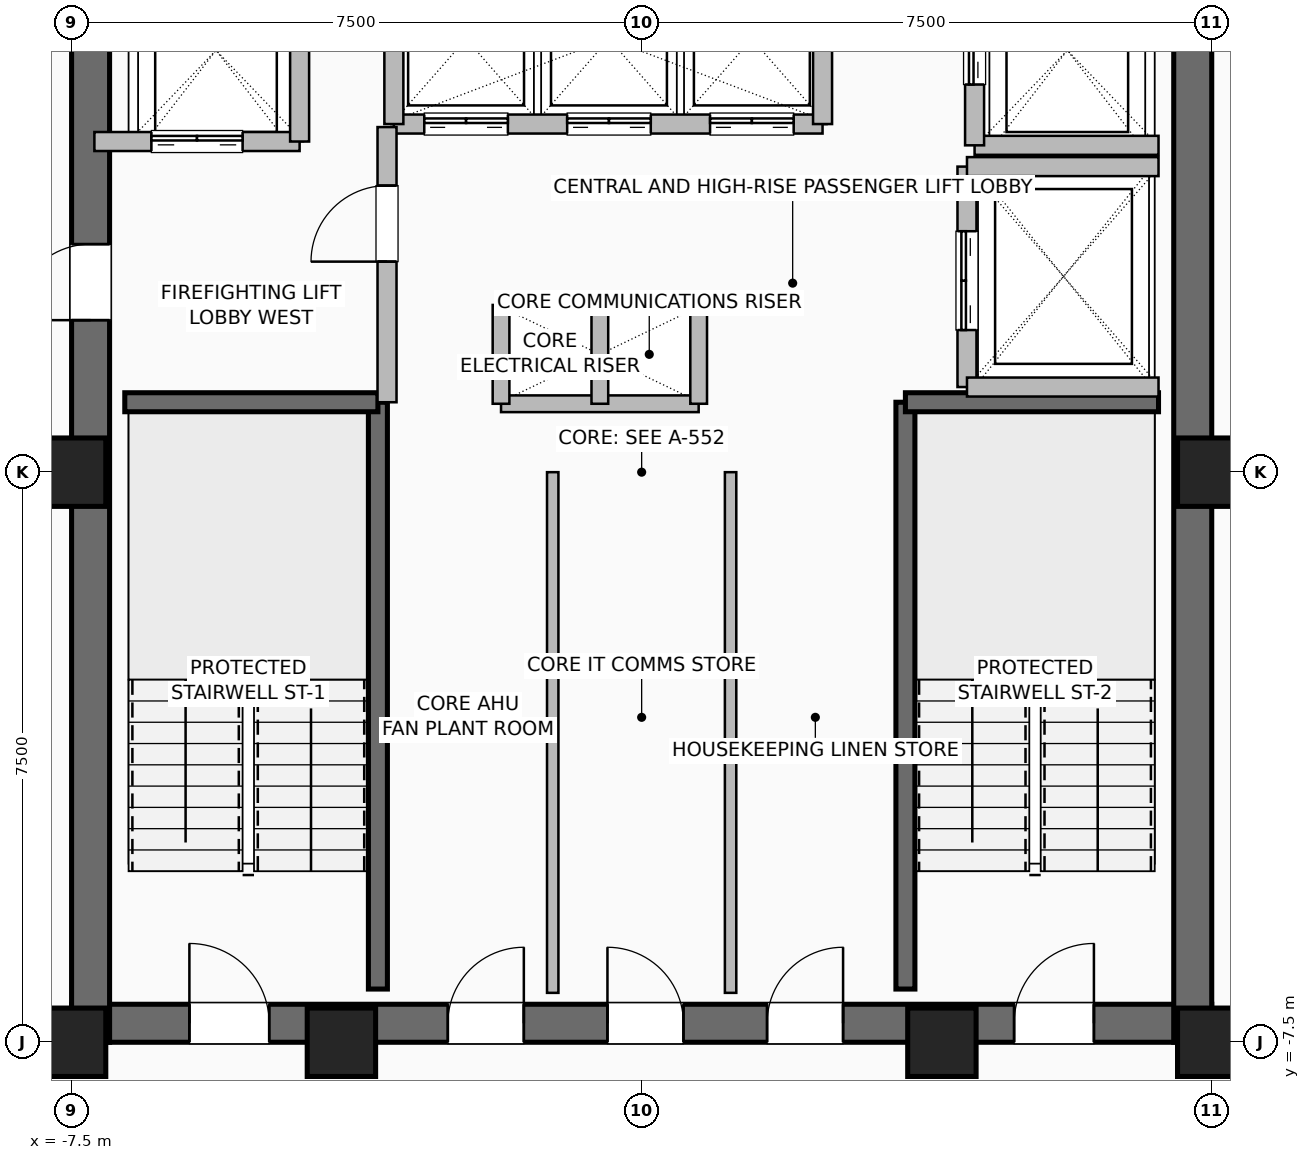
"""IFC4 building model, lengths in metres.
Left out: names, types, materials, properties, quantities, classifications, styles, units other than length and angle.
Written with IfcOpenShell. Run it as: python <this file> out.ifc"""

import sys

from ifc_helpers import new_model, si_unit, direction, frame, frame_2d, origin, origin_2d, place, context, subcontext, project, spatial, rectangle, hollow_rectangle, extrude, element, fill, save


model = new_model("IFC4")
c1 = context("Model", 3, precision=1e-05, world=origin(), true_north=direction((0.0, 1.0)))
c2 = subcontext(c1, "Body", "Model", "MODEL_VIEW")
j1 = project(units=[si_unit("LENGTHUNIT", "METRE"), si_unit("PLANEANGLEUNIT", "RADIAN")], contexts=[c1])
p1 = place(None, origin())
s1 = spatial("IfcSite", under=j1, at=p1, CompositionType="ELEMENT")
p2 = place(p1, origin())
s2 = spatial("IfcBuilding", under=s1, at=p2, CompositionType="ELEMENT")
p3 = place(p2, frame((0.0, 0.0, 205.8)))
s3 = spatial("IfcBuildingStorey", under=s2, at=p3, CompositionType="ELEMENT", Elevation=205.8)
for number, where, z_axis, x_axis in (
    (1, (-7.5, -7.5, 0.0), (0.0, 0.0, 1.0), (1.0, 0.0, 0.0)),
    (2, (-3.95, -7.5, 0.0), (0.0, 0.0, 1.0), (1.0, 0.0, 0.0)),
    (3, (3.95, -7.5, 0.0), (0.0, 0.0, 1.0), (1.0, 0.0, 0.0)),
    (4, (7.5, -7.5, 0.0), (0.0, 0.0, 1.0), (1.0, 0.0, 0.0)),
    (5, (7.5, 0.0, 0.0), (0.0, 0.0, 1.0), (1.0, 0.0, 0.0)),
    (6, (-7.5, 0.0, 0.0), (0.0, 0.0, 1.0), (1.0, 0.0, 0.0)),
):
    element("IfcColumn", number, at=place(p3, frame(where, z_axis=z_axis, x_axis=x_axis)), inside=s3, PredefinedType="COLUMN", context=c2, shape_type="SweptSolid", body=[
        extrude(hollow_rectangle(XDim=0.9, YDim=0.9, WallThickness=0.045, at=origin_2d()), origin(), (0.0, 0.0, 1.0), 3.6),
    ])
p4 = place(p3, frame((-7.5, -7.25, 0.0), z_axis=(0.0, 0.0, 1.0), x_axis=(1.0, 0.0, 0.0)))
e7 = element("IfcWall", 7, at=p4, inside=s3, PredefinedType="SHEAR", context=c2, shape_type="SweptSolid", body=[
    extrude(rectangle(XDim=15.0, YDim=0.5, at=frame_2d((7.5, 0.0))), origin(), (0.0, 0.0, 1.0), 3.36),
])
p5 = place(p4, frame((1.55, 0.0, 0.0)))
e8 = element("IfcOpeningElement", 8, at=p5, cuts=e7, PredefinedType="OPENING", context=c2, shape_type="SweptSolid", body=[
    extrude(rectangle(XDim=1.05, YDim=2.08, at=frame_2d((0.525, 1.04))), frame((0.0, 0.26, 0.0), z_axis=(0.0, -1.0, 0.0), x_axis=(1.0, 0.0, 0.0)), (0.0, 0.0, 1.0), 0.52),
])
p6 = place(p4, frame((12.4, 0.0, 0.0)))
e9 = element("IfcOpeningElement", 9, at=p6, cuts=e7, PredefinedType="OPENING", context=c2, shape_type="SweptSolid", body=[
    extrude(rectangle(XDim=1.05, YDim=2.08, at=frame_2d((0.525, 1.04))), frame((0.0, 0.26, 0.0), z_axis=(0.0, -1.0, 0.0), x_axis=(1.0, 0.0, 0.0)), (0.0, 0.0, 1.0), 0.52),
])
p7 = place(p4, frame((4.95, 0.0, 0.0)))
e10 = element("IfcOpeningElement", 10, at=p7, cuts=e7, PredefinedType="OPENING", context=c2, shape_type="SweptSolid", body=[
    extrude(rectangle(XDim=1.0, YDim=2.08, at=frame_2d((0.5, 1.04))), frame((0.0, 0.26, 0.0), z_axis=(0.0, -1.0, 0.0), x_axis=(1.0, 0.0, 0.0)), (0.0, 0.0, 1.0), 0.52),
])
p8 = place(p4, frame((7.05, 0.0, 0.0)))
e11 = element("IfcOpeningElement", 11, at=p8, cuts=e7, PredefinedType="OPENING", context=c2, shape_type="SweptSolid", body=[
    extrude(rectangle(XDim=1.0, YDim=2.08, at=frame_2d((0.5, 1.04))), frame((0.0, 0.26, 0.0), z_axis=(0.0, -1.0, 0.0), x_axis=(1.0, 0.0, 0.0)), (0.0, 0.0, 1.0), 0.52),
])
p9 = place(p4, frame((9.15, 0.0, 0.0)))
e12 = element("IfcOpeningElement", 12, at=p9, cuts=e7, PredefinedType="OPENING", context=c2, shape_type="SweptSolid", body=[
    extrude(rectangle(XDim=1.0, YDim=2.08, at=frame_2d((0.5, 1.04))), frame((0.0, 0.26, 0.0), z_axis=(0.0, -1.0, 0.0), x_axis=(1.0, 0.0, 0.0)), (0.0, 0.0, 1.0), 0.52),
])
p10 = place(p3, frame((-7.25, -7.5, 0.0), z_axis=(0.0, 0.0, 1.0), x_axis=(0.0, 1.0, 0.0)))
e13 = element("IfcWall", 13, at=p10, inside=s3, PredefinedType="SHEAR", context=c2, shape_type="SweptSolid", body=[
    extrude(rectangle(XDim=15.0, YDim=0.5, at=frame_2d((7.5, 0.0))), origin(), (0.0, 0.0, 1.0), 3.36),
])
p11 = place(p10, frame((9.5, 0.0, 0.0)))
e14 = element("IfcOpeningElement", 14, at=p11, cuts=e13, PredefinedType="OPENING", context=c2, shape_type="SweptSolid", body=[
    extrude(rectangle(XDim=1.0, YDim=2.08, at=frame_2d((0.5, 1.04))), frame((0.0, 0.26, 0.0), z_axis=(0.0, -1.0, 0.0), x_axis=(1.0, 0.0, 0.0)), (0.0, 0.0, 1.0), 0.52),
])
p12 = place(p3, frame((7.25, -7.5, 0.0), z_axis=(0.0, 0.0, 1.0), x_axis=(0.0, 1.0, 0.0)))
e15 = element("IfcWall", 15, at=p12, inside=s3, PredefinedType="SHEAR", context=c2, shape_type="SweptSolid", body=[
    extrude(rectangle(XDim=15.0, YDim=0.5, at=frame_2d((7.5, 0.0))), origin(), (0.0, 0.0, 1.0), 3.36),
])
p13 = place(p3, frame((-3.47, -6.8, 0.0), z_axis=(0.0, 0.0, 1.0), x_axis=(0.0, 1.0, 0.0)))
e16 = element("IfcWall", 16, at=p13, inside=s3, PredefinedType="SHEAR", context=c2, shape_type="SweptSolid", body=[
    extrude(rectangle(XDim=7.72, YDim=0.25, at=frame_2d((3.86, 0.0))), origin(), (0.0, 0.0, 1.0), 3.36),
])
p14 = place(p3, frame((-6.8, 0.92, 0.0), z_axis=(0.0, 0.0, 1.0), x_axis=(1.0, 0.0, 0.0)))
e17 = element("IfcWall", 17, at=p14, inside=s3, PredefinedType="SHEAR", context=c2, shape_type="SweptSolid", body=[
    extrude(rectangle(XDim=3.33, YDim=0.25, at=frame_2d((1.665, 0.0))), origin(), (0.0, 0.0, 1.0), 3.36),
])
p15 = place(p3, frame((3.47, -6.8, 0.0), z_axis=(0.0, 0.0, 1.0), x_axis=(0.0, 1.0, 0.0)))
e18 = element("IfcWall", 18, at=p15, inside=s3, PredefinedType="SHEAR", context=c2, shape_type="SweptSolid", body=[
    extrude(rectangle(XDim=7.72, YDim=0.25, at=frame_2d((3.86, 0.0))), origin(), (0.0, 0.0, 1.0), 3.36),
])
p16 = place(p3, frame((3.47, 0.92, 0.0), z_axis=(0.0, 0.0, 1.0), x_axis=(1.0, 0.0, 0.0)))
e19 = element("IfcWall", 19, at=p16, inside=s3, PredefinedType="SHEAR", context=c2, shape_type="SweptSolid", body=[
    extrude(rectangle(XDim=3.33, YDim=0.25, at=frame_2d((1.665, 0.0))), origin(), (0.0, 0.0, 1.0), 3.36),
])
for number, where, z_axis, x_axis in (
    (20, (-1.85, 2.2, 0.0), (0.0, 0.0, 1.0), (1.0, 0.0, 0.0)),
    (21, (-1.85, 0.9, 0.0), (0.0, 0.0, 1.0), (1.0, 0.0, 0.0)),
):
    element("IfcWall", number, at=place(p3, frame(where, z_axis=z_axis, x_axis=x_axis)), inside=s3, PredefinedType="PARTITIONING", context=c2, shape_type="SweptSolid", body=[
        extrude(rectangle(XDim=2.6, YDim=0.22, at=frame_2d((1.3, 0.0))), origin(), (0.0, 0.0, 1.0), 3.36),
    ])
for number, where, z_axis, x_axis in (
    (22, (-0.55, 0.9, 0.0), (0.0, 0.0, 1.0), (0.0, 1.0, 0.0)),
    (23, (0.75, 0.9, 0.0), (0.0, 0.0, 1.0), (0.0, 1.0, 0.0)),
    (24, (-1.85, 0.9, 0.0), (0.0, 0.0, 1.0), (0.0, 1.0, 0.0)),
):
    element("IfcWall", number, at=place(p3, frame(where, z_axis=z_axis, x_axis=x_axis)), inside=s3, PredefinedType="PARTITIONING", context=c2, shape_type="SweptSolid", body=[
        extrude(rectangle(XDim=1.3, YDim=0.22, at=frame_2d((0.65, 0.0))), origin(), (0.0, 0.0, 1.0), 3.36),
    ])
p17 = place(p3, frame((-3.26, 4.58, 0.0), z_axis=(0.0, 0.0, 1.0), x_axis=(1.0, 0.0, 0.0)))
e25 = element("IfcWall", 25, at=p17, inside=s3, PredefinedType="SHEAR", context=c2, shape_type="SweptSolid", body=[
    extrude(rectangle(XDim=5.64, YDim=0.25, at=frame_2d((2.82, 0.0))), origin(), (0.0, 0.0, 1.0), 3.36),
])
p18 = place(p17, frame((0.4, 0.0, 0.0)))
e26 = element("IfcOpeningElement", 26, at=p18, cuts=e25, PredefinedType="OPENING", context=c2, shape_type="SweptSolid", body=[
    extrude(rectangle(XDim=1.1, YDim=2.2, at=frame_2d((0.55, 1.1))), frame((0.0, 0.135, 0.0), z_axis=(0.0, -1.0, 0.0), x_axis=(1.0, 0.0, 0.0)), (0.0, 0.0, 1.0), 0.27),
])
p19 = place(p17, frame((2.28, 0.0, 0.0)))
e27 = element("IfcOpeningElement", 27, at=p19, cuts=e25, PredefinedType="OPENING", context=c2, shape_type="SweptSolid", body=[
    extrude(rectangle(XDim=1.1, YDim=2.2, at=frame_2d((0.55, 1.1))), frame((0.0, 0.135, 0.0), z_axis=(0.0, -1.0, 0.0), x_axis=(1.0, 0.0, 0.0)), (0.0, 0.0, 1.0), 0.27),
])
p20 = place(p17, frame((4.16, 0.0, 0.0)))
e28 = element("IfcOpeningElement", 28, at=p20, cuts=e25, PredefinedType="OPENING", context=c2, shape_type="SweptSolid", body=[
    extrude(rectangle(XDim=1.1, YDim=2.2, at=frame_2d((0.55, 1.1))), frame((0.0, 0.135, 0.0), z_axis=(0.0, -1.0, 0.0), x_axis=(1.0, 0.0, 0.0)), (0.0, 0.0, 1.0), 0.27),
])
for number, where, z_axis, x_axis in (
    (29, (-3.26, 4.58, 0.0), (0.0, 0.0, 1.0), (0.0, 1.0, 0.0)),
    (30, (2.38, 4.58, 0.0), (0.0, 0.0, 1.0), (0.0, 1.0, 0.0)),
):
    element("IfcWall", number, at=place(p3, frame(where, z_axis=z_axis, x_axis=x_axis)), inside=s3, PredefinedType="SHEAR", context=c2, shape_type="SweptSolid", body=[
        extrude(rectangle(XDim=2.22, YDim=0.25, at=frame_2d((1.11, 0.0))), origin(), (0.0, 0.0, 1.0), 3.36),
    ])
p21 = place(p3, frame((-7.2, 4.35, 0.0), z_axis=(0.0, 0.0, 1.0), x_axis=(1.0, 0.0, 0.0)))
e31 = element("IfcWall", 31, at=p21, inside=s3, PredefinedType="SHEAR", context=c2, shape_type="SweptSolid", body=[
    extrude(rectangle(XDim=2.7, YDim=0.25, at=frame_2d((1.35, 0.0))), origin(), (0.0, 0.0, 1.0), 3.36),
])
p22 = place(p21, frame((0.75, 0.0, 0.0)))
e32 = element("IfcOpeningElement", 32, at=p22, cuts=e31, PredefinedType="OPENING", context=c2, shape_type="SweptSolid", body=[
    extrude(rectangle(XDim=1.2, YDim=2.2, at=frame_2d((0.6, 1.1))), frame((0.0, 0.135, 0.0), z_axis=(0.0, -1.0, 0.0), x_axis=(1.0, 0.0, 0.0)), (0.0, 0.0, 1.0), 0.27),
])
p23 = place(p3, frame((-4.5, 4.35, 0.0), z_axis=(0.0, 0.0, 1.0), x_axis=(0.0, 1.0, 0.0)))
e33 = element("IfcWall", 33, at=p23, inside=s3, PredefinedType="SHEAR", context=c2, shape_type="SweptSolid", body=[
    extrude(rectangle(XDim=2.85, YDim=0.25, at=frame_2d((1.425, 0.0))), origin(), (0.0, 0.0, 1.0), 3.36),
])
p24 = place(p3, frame((4.38, 4.3, 0.0), z_axis=(0.0, 0.0, 1.0), x_axis=(1.0, 0.0, 0.0)))
e34 = element("IfcWall", 34, at=p24, inside=s3, PredefinedType="SHEAR", context=c2, shape_type="SweptSolid", body=[
    extrude(rectangle(XDim=2.42, YDim=0.25, at=frame_2d((1.21, 0.0))), origin(), (0.0, 0.0, 1.0), 3.36),
])
p25 = place(p3, frame((4.38, 4.3, 0.0), z_axis=(0.0, 0.0, 1.0), x_axis=(0.0, 1.0, 0.0)))
e35 = element("IfcWall", 35, at=p25, inside=s3, PredefinedType="SHEAR", context=c2, shape_type="SweptSolid", body=[
    extrude(rectangle(XDim=2.5, YDim=0.25, at=frame_2d((1.25, 0.0))), origin(), (0.0, 0.0, 1.0), 3.36),
])
p26 = place(p25, frame((0.8, 0.0, 0.0)))
e36 = element("IfcOpeningElement", 36, at=p26, cuts=e35, PredefinedType="OPENING", context=c2, shape_type="SweptSolid", body=[
    extrude(rectangle(XDim=1.2, YDim=2.2, at=frame_2d((0.6, 1.1))), frame((0.0, 0.135, 0.0), z_axis=(0.0, -1.0, 0.0), x_axis=(1.0, 0.0, 0.0)), (0.0, 0.0, 1.0), 0.27),
])
p27 = place(p3, frame((4.28, 1.12, 0.0), z_axis=(0.0, 0.0, 1.0), x_axis=(0.0, 1.0, 0.0)))
e37 = element("IfcWall", 37, at=p27, inside=s3, PredefinedType="SHEAR", context=c2, shape_type="SweptSolid", body=[
    extrude(rectangle(XDim=2.9, YDim=0.25, at=frame_2d((1.45, 0.0))), origin(), (0.0, 0.0, 1.0), 3.36),
])
p28 = place(p27, frame((0.75, 0.0, 0.0)))
e38 = element("IfcOpeningElement", 38, at=p28, cuts=e37, PredefinedType="OPENING", context=c2, shape_type="SweptSolid", body=[
    extrude(rectangle(XDim=1.3, YDim=2.3, at=frame_2d((0.65, 1.15))), frame((0.0, 0.135, 0.0), z_axis=(0.0, -1.0, 0.0), x_axis=(1.0, 0.0, 0.0)), (0.0, 0.0, 1.0), 0.27),
])
for number, where, z_axis, x_axis in (
    (39, (4.28, 1.12, 0.0), (0.0, 0.0, 1.0), (1.0, 0.0, 0.0)),
    (40, (4.28, 4.02, 0.0), (0.0, 0.0, 1.0), (1.0, 0.0, 0.0)),
):
    element("IfcWall", number, at=place(p3, frame(where, z_axis=z_axis, x_axis=x_axis)), inside=s3, PredefinedType="SHEAR", context=c2, shape_type="SweptSolid", body=[
        extrude(rectangle(XDim=2.52, YDim=0.25, at=frame_2d((1.26, 0.0))), origin(), (0.0, 0.0, 1.0), 3.36),
    ])
p29 = place(p3, frame((-3.35, 0.92, 0.0), z_axis=(0.0, 0.0, 1.0), x_axis=(0.0, 1.0, 0.0)))
e41 = element("IfcWall", 41, at=p29, inside=s3, PredefinedType="SHEAR", context=c2, shape_type="SweptSolid", body=[
    extrude(rectangle(XDim=3.62, YDim=0.25, at=frame_2d((1.81, 0.0))), origin(), (0.0, 0.0, 1.0), 3.36),
])
p30 = place(p29, frame((1.85, 0.0, 0.0)))
e42 = element("IfcOpeningElement", 42, at=p30, cuts=e41, PredefinedType="OPENING", context=c2, shape_type="SweptSolid", body=[
    extrude(rectangle(XDim=1.0, YDim=2.08, at=frame_2d((0.5, 1.04))), frame((0.0, 0.135, 0.0), z_axis=(0.0, -1.0, 0.0), x_axis=(1.0, 0.0, 0.0)), (0.0, 0.0, 1.0), 0.27),
])
for number, where, z_axis, x_axis in (
    (43, (-1.17, -6.85, 0.0), (0.0, 0.0, 1.0), (0.0, 1.0, 0.0)),
    (44, (1.17, -6.85, 0.0), (0.0, 0.0, 1.0), (0.0, 1.0, 0.0)),
):
    element("IfcWall", number, at=place(p3, frame(where, z_axis=z_axis, x_axis=x_axis)), inside=s3, PredefinedType="PARTITIONING", context=c2, shape_type="SweptSolid", body=[
        extrude(rectangle(XDim=6.85, YDim=0.15, at=frame_2d((3.425, 0.0))), origin(), (0.0, 0.0, 1.0), 3.36),
    ])
p31 = place(p3, frame((7.45, -7.48, 0.0), z_axis=(0.0, 0.0, 1.0), x_axis=(1.0, 0.0, 0.0)))
e45 = element("IfcWall", 45, at=p31, inside=s3, PredefinedType="PARTITIONING", context=c2, shape_type="SweptSolid", body=[
    extrude(rectangle(XDim=0.95, YDim=0.15, at=frame_2d((0.475, 0.0))), origin(), (0.0, 0.0, 1.0), 3.36),
])
p32 = place(p5, origin())
e46 = element("IfcDoor", 46, at=p32, inside=s3, OperationType="SINGLE_SWING_LEFT", PredefinedType="DOOR", context=c2, shape_type="SweptSolid", body=[
    extrude(rectangle(XDim=1.05, YDim=2.08, at=frame_2d((0.525, 1.04))), frame((0.0, 0.025, 0.0), z_axis=(0.0, -1.0, 0.0), x_axis=(1.0, 0.0, 0.0)), (0.0, 0.0, 1.0), 0.05),
])
fill(e8, e46)
p33 = place(p6, origin())
e47 = element("IfcDoor", 47, at=p33, inside=s3, OperationType="SINGLE_SWING_RIGHT", PredefinedType="DOOR", context=c2, shape_type="SweptSolid", body=[
    extrude(rectangle(XDim=1.05, YDim=2.08, at=frame_2d((0.525, 1.04))), frame((0.0, 0.025, 0.0), z_axis=(0.0, -1.0, 0.0), x_axis=(1.0, 0.0, 0.0)), (0.0, 0.0, 1.0), 0.05),
])
fill(e9, e47)
p34 = place(p11, origin())
e48 = element("IfcDoor", 48, at=p34, inside=s3, OperationType="SINGLE_SWING_LEFT", PredefinedType="DOOR", context=c2, shape_type="SweptSolid", body=[
    extrude(rectangle(XDim=1.0, YDim=2.08, at=frame_2d((0.5, 1.04))), frame((0.0, 0.025, 0.0), z_axis=(0.0, -1.0, 0.0), x_axis=(1.0, 0.0, 0.0)), (0.0, 0.0, 1.0), 0.05),
])
fill(e14, e48)
p35 = place(p7, origin())
e49 = element("IfcDoor", 49, at=p35, inside=s3, OperationType="SINGLE_SWING_RIGHT", PredefinedType="DOOR", context=c2, shape_type="SweptSolid", body=[
    extrude(rectangle(XDim=1.0, YDim=2.08, at=frame_2d((0.5, 1.04))), frame((0.0, 0.025, 0.0), z_axis=(0.0, -1.0, 0.0), x_axis=(1.0, 0.0, 0.0)), (0.0, 0.0, 1.0), 0.05),
])
fill(e10, e49)
p36 = place(p8, origin())
e50 = element("IfcDoor", 50, at=p36, inside=s3, OperationType="SINGLE_SWING_LEFT", PredefinedType="DOOR", context=c2, shape_type="SweptSolid", body=[
    extrude(rectangle(XDim=1.0, YDim=2.08, at=frame_2d((0.5, 1.04))), frame((0.0, 0.025, 0.0), z_axis=(0.0, -1.0, 0.0), x_axis=(1.0, 0.0, 0.0)), (0.0, 0.0, 1.0), 0.05),
])
fill(e11, e50)
p37 = place(p9, origin())
e51 = element("IfcDoor", 51, at=p37, inside=s3, OperationType="SINGLE_SWING_RIGHT", PredefinedType="DOOR", context=c2, shape_type="SweptSolid", body=[
    extrude(rectangle(XDim=1.0, YDim=2.08, at=frame_2d((0.5, 1.04))), frame((0.0, 0.025, 0.0), z_axis=(0.0, -1.0, 0.0), x_axis=(1.0, 0.0, 0.0)), (0.0, 0.0, 1.0), 0.05),
])
fill(e12, e51)
p38 = place(p18, origin())
e52 = element("IfcDoor", 52, at=p38, inside=s3, OperationType="DOUBLE_DOOR_SLIDING", PredefinedType="DOOR", context=c2, shape_type="SweptSolid", body=[
    extrude(rectangle(XDim=1.1, YDim=2.2, at=frame_2d((0.55, 1.1))), frame((0.0, 0.025, 0.0), z_axis=(0.0, -1.0, 0.0), x_axis=(1.0, 0.0, 0.0)), (0.0, 0.0, 1.0), 0.05),
])
fill(e26, e52)
p39 = place(p19, origin())
e53 = element("IfcDoor", 53, at=p39, inside=s3, OperationType="DOUBLE_DOOR_SLIDING", PredefinedType="DOOR", context=c2, shape_type="SweptSolid", body=[
    extrude(rectangle(XDim=1.1, YDim=2.2, at=frame_2d((0.55, 1.1))), frame((0.0, 0.025, 0.0), z_axis=(0.0, -1.0, 0.0), x_axis=(1.0, 0.0, 0.0)), (0.0, 0.0, 1.0), 0.05),
])
fill(e27, e53)
p40 = place(p20, origin())
e54 = element("IfcDoor", 54, at=p40, inside=s3, OperationType="DOUBLE_DOOR_SLIDING", PredefinedType="DOOR", context=c2, shape_type="SweptSolid", body=[
    extrude(rectangle(XDim=1.1, YDim=2.2, at=frame_2d((0.55, 1.1))), frame((0.0, 0.025, 0.0), z_axis=(0.0, -1.0, 0.0), x_axis=(1.0, 0.0, 0.0)), (0.0, 0.0, 1.0), 0.05),
])
fill(e28, e54)
p41 = place(p22, origin())
e55 = element("IfcDoor", 55, at=p41, inside=s3, OperationType="DOUBLE_DOOR_SLIDING", PredefinedType="DOOR", context=c2, shape_type="SweptSolid", body=[
    extrude(rectangle(XDim=1.2, YDim=2.2, at=frame_2d((0.6, 1.1))), frame((0.0, 0.025, 0.0), z_axis=(0.0, -1.0, 0.0), x_axis=(1.0, 0.0, 0.0)), (0.0, 0.0, 1.0), 0.05),
])
fill(e32, e55)
p42 = place(p26, origin())
e56 = element("IfcDoor", 56, at=p42, inside=s3, OperationType="DOUBLE_DOOR_SLIDING", PredefinedType="DOOR", context=c2, shape_type="SweptSolid", body=[
    extrude(rectangle(XDim=1.2, YDim=2.2, at=frame_2d((0.6, 1.1))), frame((0.0, 0.025, 0.0), z_axis=(0.0, -1.0, 0.0), x_axis=(1.0, 0.0, 0.0)), (0.0, 0.0, 1.0), 0.05),
])
fill(e36, e56)
p43 = place(p28, origin())
e57 = element("IfcDoor", 57, at=p43, inside=s3, OperationType="DOUBLE_DOOR_SLIDING", PredefinedType="DOOR", context=c2, shape_type="SweptSolid", body=[
    extrude(rectangle(XDim=1.3, YDim=2.3, at=frame_2d((0.65, 1.15))), frame((0.0, 0.025, 0.0), z_axis=(0.0, -1.0, 0.0), x_axis=(1.0, 0.0, 0.0)), (0.0, 0.0, 1.0), 0.05),
])
fill(e38, e57)
p44 = place(p30, origin())
e58 = element("IfcDoor", 58, at=p44, inside=s3, OperationType="SINGLE_SWING_LEFT", PredefinedType="DOOR", context=c2, shape_type="SweptSolid", body=[
    extrude(rectangle(XDim=1.0, YDim=2.08, at=frame_2d((0.5, 1.04))), frame((0.0, 0.025, 0.0), z_axis=(0.0, -1.0, 0.0), x_axis=(1.0, 0.0, 0.0)), (0.0, 0.0, 1.0), 0.05),
])
fill(e42, e58)
save(model, sys.argv[1])
